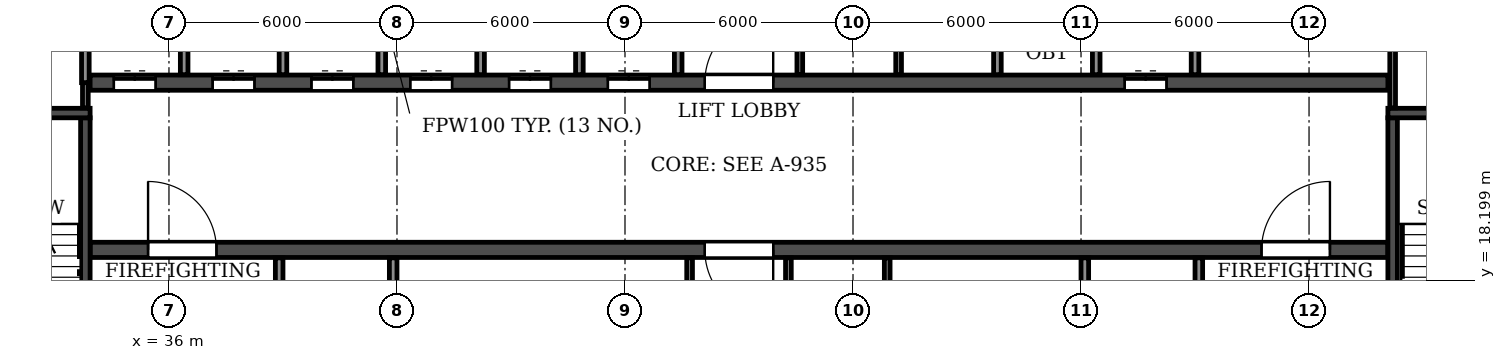
"""IFC4 building model, lengths in metres.
Left out: names, types, materials, properties, quantities, classifications, styles, units other than length and angle.
Written with IfcOpenShell. Run it as: python <this file> out.ifc"""

import sys

from ifc_helpers import new_model, si_unit, direction, frame, frame_2d, origin, place, context, subcontext, project, spatial, rectangle, extrude, element, fill, save


model = new_model("IFC4")
c1 = context("Model", 3, precision=1e-05, world=origin(), true_north=direction((0.0, 1.0)))
c2 = subcontext(c1, "Body", "Model", "MODEL_VIEW")
j1 = project(units=[si_unit("LENGTHUNIT", "METRE"), si_unit("PLANEANGLEUNIT", "RADIAN")], contexts=[c1])
p1 = place(None, origin())
s1 = spatial("IfcSite", under=j1, at=p1, CompositionType="ELEMENT")
p2 = place(p1, origin())
s2 = spatial("IfcBuilding", under=s1, at=p2, CompositionType="ELEMENT")
p3 = place(p2, frame((0.0, 0.0, 201.6)))
s3 = spatial("IfcBuildingStorey", under=s2, at=p3, CompositionType="ELEMENT", Elevation=201.6)
p4 = place(p3, frame((33.925, 19.0, 0.0), z_axis=(0.0, 0.0, 1.0), x_axis=(1.0, 0.0, 0.0)))
e1 = element("IfcWall", 1, at=p4, inside=s3, PredefinedType="SOLIDWALL", context=c2, shape_type="SweptSolid", body=[
    extrude(rectangle(XDim=34.15, YDim=0.4, at=frame_2d((17.075, 0.0))), origin(), (0.0, 0.0, 1.0), 3.08),
])
p5 = place(p4, frame((16.175, 0.0, 0.0)))
e2 = element("IfcOpeningElement", 2, at=p5, cuts=e1, PredefinedType="OPENING", context=c2, shape_type="SweptSolid", body=[
    extrude(rectangle(XDim=1.8, YDim=2.1, at=frame_2d((0.9, 1.05))), frame((0.0, 0.21, 0.0), z_axis=(0.0, -1.0, 0.0), x_axis=(1.0, 0.0, 0.0)), (0.0, 0.0, 1.0), 0.42),
])
p6 = place(p4, frame((1.525, 0.0, 0.0)))
e3 = element("IfcOpeningElement", 3, at=p6, cuts=e1, PredefinedType="OPENING", context=c2, shape_type="SweptSolid", body=[
    extrude(rectangle(XDim=1.8, YDim=2.1, at=frame_2d((0.9, 1.05))), frame((0.0, 0.21, 0.0), z_axis=(0.0, -1.0, 0.0), x_axis=(1.0, 0.0, 0.0)), (0.0, 0.0, 1.0), 0.42),
])
p7 = place(p4, frame((30.825, 0.0, 0.0)))
e4 = element("IfcOpeningElement", 4, at=p7, cuts=e1, PredefinedType="OPENING", context=c2, shape_type="SweptSolid", body=[
    extrude(rectangle(XDim=1.8, YDim=2.1, at=frame_2d((0.9, 1.05))), frame((0.0, 0.21, 0.0), z_axis=(0.0, -1.0, 0.0), x_axis=(1.0, 0.0, 0.0)), (0.0, 0.0, 1.0), 0.42),
])
p8 = place(p3, frame((33.925, 23.4, 0.0), z_axis=(0.0, 0.0, 1.0), x_axis=(1.0, 0.0, 0.0)))
e5 = element("IfcWall", 5, at=p8, inside=s3, PredefinedType="SOLIDWALL", context=c2, shape_type="SweptSolid", body=[
    extrude(rectangle(XDim=34.15, YDim=0.4, at=frame_2d((17.075, 0.0))), origin(), (0.0, 0.0, 1.0), 3.08),
])
p9 = place(p8, frame((16.175, 0.0, 0.0)))
e6 = element("IfcOpeningElement", 6, at=p9, cuts=e5, PredefinedType="OPENING", context=c2, shape_type="SweptSolid", body=[
    extrude(rectangle(XDim=1.8, YDim=2.1, at=frame_2d((0.9, 1.05))), frame((0.0, 0.21, 0.0), z_axis=(0.0, -1.0, 0.0), x_axis=(1.0, 0.0, 0.0)), (0.0, 0.0, 1.0), 0.42),
])
p10 = place(p8, frame((0.625, 0.0, 0.0)))
e7 = element("IfcOpeningElement", 7, at=p10, cuts=e5, PredefinedType="OPENING", context=c2, shape_type="SweptSolid", body=[
    extrude(rectangle(XDim=1.1, YDim=2.1, at=frame_2d((0.55, 1.05))), frame((0.0, 0.21, 0.0), z_axis=(0.0, -1.0, 0.0), x_axis=(1.0, 0.0, 0.0)), (0.0, 0.0, 1.0), 0.42),
])
p11 = place(p8, frame((3.225, 0.0, 0.0)))
e8 = element("IfcOpeningElement", 8, at=p11, cuts=e5, PredefinedType="OPENING", context=c2, shape_type="SweptSolid", body=[
    extrude(rectangle(XDim=1.1, YDim=2.1, at=frame_2d((0.55, 1.05))), frame((0.0, 0.21, 0.0), z_axis=(0.0, -1.0, 0.0), x_axis=(1.0, 0.0, 0.0)), (0.0, 0.0, 1.0), 0.42),
])
p12 = place(p8, frame((5.825, 0.0, 0.0)))
e9 = element("IfcOpeningElement", 9, at=p12, cuts=e5, PredefinedType="OPENING", context=c2, shape_type="SweptSolid", body=[
    extrude(rectangle(XDim=1.1, YDim=2.1, at=frame_2d((0.55, 1.05))), frame((0.0, 0.21, 0.0), z_axis=(0.0, -1.0, 0.0), x_axis=(1.0, 0.0, 0.0)), (0.0, 0.0, 1.0), 0.42),
])
p13 = place(p8, frame((8.425, 0.0, 0.0)))
e10 = element("IfcOpeningElement", 10, at=p13, cuts=e5, PredefinedType="OPENING", context=c2, shape_type="SweptSolid", body=[
    extrude(rectangle(XDim=1.1, YDim=2.1, at=frame_2d((0.55, 1.05))), frame((0.0, 0.21, 0.0), z_axis=(0.0, -1.0, 0.0), x_axis=(1.0, 0.0, 0.0)), (0.0, 0.0, 1.0), 0.42),
])
p14 = place(p8, frame((11.025, 0.0, 0.0)))
e11 = element("IfcOpeningElement", 11, at=p14, cuts=e5, PredefinedType="OPENING", context=c2, shape_type="SweptSolid", body=[
    extrude(rectangle(XDim=1.1, YDim=2.1, at=frame_2d((0.55, 1.05))), frame((0.0, 0.21, 0.0), z_axis=(0.0, -1.0, 0.0), x_axis=(1.0, 0.0, 0.0)), (0.0, 0.0, 1.0), 0.42),
])
p15 = place(p8, frame((13.625, 0.0, 0.0)))
e12 = element("IfcOpeningElement", 12, at=p15, cuts=e5, PredefinedType="OPENING", context=c2, shape_type="SweptSolid", body=[
    extrude(rectangle(XDim=1.1, YDim=2.1, at=frame_2d((0.55, 1.05))), frame((0.0, 0.21, 0.0), z_axis=(0.0, -1.0, 0.0), x_axis=(1.0, 0.0, 0.0)), (0.0, 0.0, 1.0), 0.42),
])
p16 = place(p8, frame((27.225, 0.0, 0.0)))
e13 = element("IfcOpeningElement", 13, at=p16, cuts=e5, PredefinedType="OPENING", context=c2, shape_type="SweptSolid", body=[
    extrude(rectangle(XDim=1.1, YDim=2.1, at=frame_2d((0.55, 1.05))), frame((0.0, 0.21, 0.0), z_axis=(0.0, -1.0, 0.0), x_axis=(1.0, 0.0, 0.0)), (0.0, 0.0, 1.0), 0.42),
])
p17 = place(p3, frame((33.8, 14.8, 0.0), z_axis=(0.0, 0.0, 1.0), x_axis=(0.0, 1.0, 0.0)))
e14 = element("IfcWall", 14, at=p17, inside=s3, PredefinedType="SOLIDWALL", context=c2, shape_type="SweptSolid", body=[
    extrude(rectangle(XDim=7.675, YDim=0.25, at=frame_2d((3.837, 0.0))), origin(), (0.0, 0.0, 1.0), 3.08),
])
p18 = place(p17, frame((0.5, 0.0, 0.0)))
e15 = element("IfcOpeningElement", 15, at=p18, cuts=e14, PredefinedType="OPENING", context=c2, shape_type="SweptSolid", body=[
    extrude(rectangle(XDim=1.0, YDim=2.1, at=frame_2d((0.5, 1.05))), frame((0.0, 0.135, 0.0), z_axis=(0.0, -1.0, 0.0), x_axis=(1.0, 0.0, 0.0)), (0.0, 0.0, 1.0), 0.27),
])
p19 = place(p3, frame((29.875, 22.6, 0.0), z_axis=(0.0, 0.0, 1.0), x_axis=(1.0, 0.0, 0.0)))
e16 = element("IfcWall", 16, at=p19, inside=s3, PredefinedType="SOLIDWALL", context=c2, shape_type="SweptSolid", body=[
    extrude(rectangle(XDim=4.05, YDim=0.25, at=frame_2d((2.025, 0.0))), origin(), (0.0, 0.0, 1.0), 3.08),
])
p20 = place(p3, frame((68.2, 14.8, 0.0), z_axis=(0.0, 0.0, 1.0), x_axis=(0.0, 1.0, 0.0)))
e17 = element("IfcWall", 17, at=p20, inside=s3, PredefinedType="SOLIDWALL", context=c2, shape_type="SweptSolid", body=[
    extrude(rectangle(XDim=7.675, YDim=0.25, at=frame_2d((3.837, 0.0))), origin(), (0.0, 0.0, 1.0), 3.08),
])
p21 = place(p20, frame((0.5, 0.0, 0.0)))
e18 = element("IfcOpeningElement", 18, at=p21, cuts=e17, PredefinedType="OPENING", context=c2, shape_type="SweptSolid", body=[
    extrude(rectangle(XDim=1.0, YDim=2.1, at=frame_2d((0.5, 1.05))), frame((0.0, 0.135, 0.0), z_axis=(0.0, -1.0, 0.0), x_axis=(1.0, 0.0, 0.0)), (0.0, 0.0, 1.0), 0.27),
])
p22 = place(p3, frame((68.075, 22.6, 0.0), z_axis=(0.0, 0.0, 1.0), x_axis=(1.0, 0.0, 0.0)))
e19 = element("IfcWall", 19, at=p22, inside=s3, PredefinedType="SOLIDWALL", context=c2, shape_type="SweptSolid", body=[
    extrude(rectangle(XDim=4.05, YDim=0.25, at=frame_2d((2.025, 0.0))), origin(), (0.0, 0.0, 1.0), 3.08),
])
for number, where, z_axis, x_axis in (
    (20, (49.7, 14.81, 0.0), (0.0, 0.0, 1.0), (0.0, 1.0, 0.0)),
    (21, (52.3, 14.81, 0.0), (0.0, 0.0, 1.0), (0.0, 1.0, 0.0)),
    (22, (52.6, 23.61, 0.0), (0.0, 0.0, 1.0), (0.0, 1.0, 0.0)),
    (23, (54.9, 14.81, 0.0), (0.0, 0.0, 1.0), (0.0, 1.0, 0.0)),
    (24, (55.2, 23.61, 0.0), (0.0, 0.0, 1.0), (0.0, 1.0, 0.0)),
):
    element("IfcWall", number, at=place(p3, frame(where, z_axis=z_axis, x_axis=x_axis)), inside=s3, PredefinedType="PARTITIONING", context=c2, shape_type="SweptSolid", body=[
        extrude(rectangle(XDim=3.98, YDim=0.15, at=frame_2d((1.99, 0.0))), origin(), (0.0, 0.0, 1.0), 3.08),
    ])
p23 = place(p3, frame((33.8, 22.735, 0.0), z_axis=(0.0, 0.0, 1.0), x_axis=(0.0, 1.0, 0.0)))
e25 = element("IfcWall", 25, at=p23, inside=s3, PredefinedType="PARTITIONING", context=c2, shape_type="SweptSolid", body=[
    extrude(rectangle(XDim=0.665, YDim=0.15, at=frame_2d((0.333, 0.0))), origin(), (0.0, 0.0, 1.0), 3.08),
])
p24 = place(p3, frame((68.2, 22.735, 0.0), z_axis=(0.0, 0.0, 1.0), x_axis=(0.0, 1.0, 0.0)))
e26 = element("IfcWall", 26, at=p24, inside=s3, PredefinedType="PARTITIONING", context=c2, shape_type="SweptSolid", body=[
    extrude(rectangle(XDim=4.855, YDim=0.15, at=frame_2d((2.427, 0.0))), origin(), (0.0, 0.0, 1.0), 3.08),
])
p25 = place(p3, frame((33.8, 23.4, 0.0), z_axis=(0.0, 0.0, 1.0), x_axis=(0.0, 1.0, 0.0)))
e27 = element("IfcWall", 27, at=p25, inside=s3, PredefinedType="PARTITIONING", context=c2, shape_type="SweptSolid", body=[
    extrude(rectangle(XDim=2.7, YDim=0.2, at=frame_2d((1.35, 0.0))), origin(), (0.0, 0.0, 1.0), 3.08),
])
p26 = place(p3, frame((36.4, 23.61, 0.0), z_axis=(0.0, 0.0, 1.0), x_axis=(0.0, 1.0, 0.0)))
e28 = element("IfcWall", 28, at=p26, inside=s3, PredefinedType="PARTITIONING", context=c2, shape_type="SweptSolid", body=[
    extrude(rectangle(XDim=2.49, YDim=0.2, at=frame_2d((1.245, 0.0))), origin(), (0.0, 0.0, 1.0), 3.08),
])
p27 = place(p3, frame((38.9, 14.81, 0.0), z_axis=(0.0, 0.0, 1.0), x_axis=(0.0, 1.0, 0.0)))
e29 = element("IfcWall", 29, at=p27, inside=s3, PredefinedType="PARTITIONING", context=c2, shape_type="SweptSolid", body=[
    extrude(rectangle(XDim=3.98, YDim=0.2, at=frame_2d((1.99, 0.0))), origin(), (0.0, 0.0, 1.0), 3.08),
])
p28 = place(p27, frame((1.44, 0.0, 0.0)))
e30 = element("IfcOpeningElement", 30, at=p28, cuts=e29, PredefinedType="OPENING", context=c2, shape_type="SweptSolid", body=[
    extrude(rectangle(XDim=1.1, YDim=2.1, at=frame_2d((0.55, 1.05))), frame((0.0, 0.11, 0.0), z_axis=(0.0, -1.0, 0.0), x_axis=(1.0, 0.0, 0.0)), (0.0, 0.0, 1.0), 0.22),
])
for number, where, z_axis, x_axis in (
    (31, (39.0, 23.61, 0.0), (0.0, 0.0, 1.0), (0.0, 1.0, 0.0)),
    (32, (41.6, 23.61, 0.0), (0.0, 0.0, 1.0), (0.0, 1.0, 0.0)),
):
    element("IfcWall", number, at=place(p3, frame(where, z_axis=z_axis, x_axis=x_axis)), inside=s3, PredefinedType="PARTITIONING", context=c2, shape_type="SweptSolid", body=[
        extrude(rectangle(XDim=2.49, YDim=0.2, at=frame_2d((1.245, 0.0))), origin(), (0.0, 0.0, 1.0), 3.08),
    ])
for number, where, z_axis, x_axis in (
    (33, (41.9, 14.81, 0.0), (0.0, 0.0, 1.0), (0.0, 1.0, 0.0)),
    (34, (44.2, 23.61, 0.0), (0.0, 0.0, 1.0), (0.0, 1.0, 0.0)),
    (35, (46.8, 23.61, 0.0), (0.0, 0.0, 1.0), (0.0, 1.0, 0.0)),
):
    element("IfcWall", number, at=place(p3, frame(where, z_axis=z_axis, x_axis=x_axis)), inside=s3, PredefinedType="PARTITIONING", context=c2, shape_type="SweptSolid", body=[
        extrude(rectangle(XDim=3.98, YDim=0.2, at=frame_2d((1.99, 0.0))), origin(), (0.0, 0.0, 1.0), 3.08),
    ])
for number, where, z_axis, x_axis in (
    (36, (49.4, 23.61, 0.0), (0.0, 0.0, 1.0), (0.0, 1.0, 0.0)),
    (37, (57.8, 23.61, 0.0), (0.0, 0.0, 1.0), (0.0, 1.0, 0.0)),
):
    element("IfcWall", number, at=place(p3, frame(where, z_axis=z_axis, x_axis=x_axis)), inside=s3, PredefinedType="PARTITIONING", context=c2, shape_type="SweptSolid", body=[
        extrude(rectangle(XDim=2.49, YDim=0.2, at=frame_2d((1.245, 0.0))), origin(), (0.0, 0.0, 1.0), 3.08),
    ])
p29 = place(p3, frame((60.1, 14.81, 0.0), z_axis=(0.0, 0.0, 1.0), x_axis=(0.0, 1.0, 0.0)))
e38 = element("IfcWall", 38, at=p29, inside=s3, PredefinedType="PARTITIONING", context=c2, shape_type="SweptSolid", body=[
    extrude(rectangle(XDim=3.98, YDim=0.2, at=frame_2d((1.99, 0.0))), origin(), (0.0, 0.0, 1.0), 3.08),
])
for number, where, z_axis, x_axis in (
    (39, (60.4, 23.61, 0.0), (0.0, 0.0, 1.0), (0.0, 1.0, 0.0)),
    (40, (63.0, 23.61, 0.0), (0.0, 0.0, 1.0), (0.0, 1.0, 0.0)),
):
    element("IfcWall", number, at=place(p3, frame(where, z_axis=z_axis, x_axis=x_axis)), inside=s3, PredefinedType="PARTITIONING", context=c2, shape_type="SweptSolid", body=[
        extrude(rectangle(XDim=2.49, YDim=0.2, at=frame_2d((1.245, 0.0))), origin(), (0.0, 0.0, 1.0), 3.08),
    ])
p30 = place(p3, frame((63.1, 14.81, 0.0), z_axis=(0.0, 0.0, 1.0), x_axis=(0.0, 1.0, 0.0)))
e41 = element("IfcWall", 41, at=p30, inside=s3, PredefinedType="PARTITIONING", context=c2, shape_type="SweptSolid", body=[
    extrude(rectangle(XDim=3.98, YDim=0.2, at=frame_2d((1.99, 0.0))), origin(), (0.0, 0.0, 1.0), 3.08),
])
p31 = place(p30, frame((1.44, 0.0, 0.0)))
e42 = element("IfcOpeningElement", 42, at=p31, cuts=e41, PredefinedType="OPENING", context=c2, shape_type="SweptSolid", body=[
    extrude(rectangle(XDim=1.1, YDim=2.1, at=frame_2d((0.55, 1.05))), frame((0.0, 0.11, 0.0), z_axis=(0.0, -1.0, 0.0), x_axis=(1.0, 0.0, 0.0)), (0.0, 0.0, 1.0), 0.22),
])
p32 = place(p9, origin())
e43 = element("IfcDoor", 43, at=p32, inside=s3, OperationType="DOUBLE_DOOR_SINGLE_SWING", PredefinedType="DOOR", context=c2, shape_type="SweptSolid", body=[
    extrude(rectangle(XDim=1.8, YDim=2.1, at=frame_2d((0.9, 1.05))), frame((0.0, 0.025, 0.0), z_axis=(0.0, -1.0, 0.0), x_axis=(1.0, 0.0, 0.0)), (0.0, 0.0, 1.0), 0.05),
])
fill(e6, e43)
p33 = place(p5, frame((1.8, 0.0, 0.0), z_axis=(0.0, 0.0, 1.0), x_axis=(-1.0, 0.0, 0.0)))
e44 = element("IfcDoor", 44, at=p33, inside=s3, OperationType="DOUBLE_DOOR_SINGLE_SWING", PredefinedType="DOOR", context=c2, shape_type="SweptSolid", body=[
    extrude(rectangle(XDim=1.8, YDim=2.1, at=frame_2d((0.9, 1.05))), frame((0.0, 0.025, 0.0), z_axis=(0.0, -1.0, 0.0), x_axis=(1.0, 0.0, 0.0)), (0.0, 0.0, 1.0), 0.05),
])
fill(e2, e44)
p34 = place(p10, origin())
e45 = element("IfcDoor", 45, at=p34, inside=s3, OperationType="DOUBLE_DOOR_SLIDING", PredefinedType="DOOR", context=c2, shape_type="SweptSolid", body=[
    extrude(rectangle(XDim=1.1, YDim=2.1, at=frame_2d((0.55, 1.05))), frame((0.0, 0.025, 0.0), z_axis=(0.0, -1.0, 0.0), x_axis=(1.0, 0.0, 0.0)), (0.0, 0.0, 1.0), 0.05),
])
fill(e7, e45)
p35 = place(p6, origin())
e46 = element("IfcDoor", 46, at=p35, inside=s3, OperationType="DOUBLE_DOOR_SINGLE_SWING", PredefinedType="DOOR", context=c2, shape_type="SweptSolid", body=[
    extrude(rectangle(XDim=1.8, YDim=2.1, at=frame_2d((0.9, 1.05))), frame((0.0, 0.025, 0.0), z_axis=(0.0, -1.0, 0.0), x_axis=(1.0, 0.0, 0.0)), (0.0, 0.0, 1.0), 0.05),
])
fill(e3, e46)
p36 = place(p11, origin())
e47 = element("IfcDoor", 47, at=p36, inside=s3, OperationType="DOUBLE_DOOR_SLIDING", PredefinedType="DOOR", context=c2, shape_type="SweptSolid", body=[
    extrude(rectangle(XDim=1.1, YDim=2.1, at=frame_2d((0.55, 1.05))), frame((0.0, 0.025, 0.0), z_axis=(0.0, -1.0, 0.0), x_axis=(1.0, 0.0, 0.0)), (0.0, 0.0, 1.0), 0.05),
])
fill(e8, e47)
p37 = place(p12, origin())
e48 = element("IfcDoor", 48, at=p37, inside=s3, OperationType="DOUBLE_DOOR_SLIDING", PredefinedType="DOOR", context=c2, shape_type="SweptSolid", body=[
    extrude(rectangle(XDim=1.1, YDim=2.1, at=frame_2d((0.55, 1.05))), frame((0.0, 0.025, 0.0), z_axis=(0.0, -1.0, 0.0), x_axis=(1.0, 0.0, 0.0)), (0.0, 0.0, 1.0), 0.05),
])
fill(e9, e48)
p38 = place(p13, origin())
e49 = element("IfcDoor", 49, at=p38, inside=s3, OperationType="DOUBLE_DOOR_SLIDING", PredefinedType="DOOR", context=c2, shape_type="SweptSolid", body=[
    extrude(rectangle(XDim=1.1, YDim=2.1, at=frame_2d((0.55, 1.05))), frame((0.0, 0.025, 0.0), z_axis=(0.0, -1.0, 0.0), x_axis=(1.0, 0.0, 0.0)), (0.0, 0.0, 1.0), 0.05),
])
fill(e10, e49)
p39 = place(p14, origin())
e50 = element("IfcDoor", 50, at=p39, inside=s3, OperationType="DOUBLE_DOOR_SLIDING", PredefinedType="DOOR", context=c2, shape_type="SweptSolid", body=[
    extrude(rectangle(XDim=1.1, YDim=2.1, at=frame_2d((0.55, 1.05))), frame((0.0, 0.025, 0.0), z_axis=(0.0, -1.0, 0.0), x_axis=(1.0, 0.0, 0.0)), (0.0, 0.0, 1.0), 0.05),
])
fill(e11, e50)
p40 = place(p15, origin())
e51 = element("IfcDoor", 51, at=p40, inside=s3, OperationType="DOUBLE_DOOR_SLIDING", PredefinedType="DOOR", context=c2, shape_type="SweptSolid", body=[
    extrude(rectangle(XDim=1.1, YDim=2.1, at=frame_2d((0.55, 1.05))), frame((0.0, 0.025, 0.0), z_axis=(0.0, -1.0, 0.0), x_axis=(1.0, 0.0, 0.0)), (0.0, 0.0, 1.0), 0.05),
])
fill(e12, e51)
p41 = place(p16, origin())
e52 = element("IfcDoor", 52, at=p41, inside=s3, OperationType="DOUBLE_DOOR_SLIDING", PredefinedType="DOOR", context=c2, shape_type="SweptSolid", body=[
    extrude(rectangle(XDim=1.1, YDim=2.1, at=frame_2d((0.55, 1.05))), frame((0.0, 0.025, 0.0), z_axis=(0.0, -1.0, 0.0), x_axis=(1.0, 0.0, 0.0)), (0.0, 0.0, 1.0), 0.05),
])
fill(e13, e52)
p42 = place(p7, origin())
e53 = element("IfcDoor", 53, at=p42, inside=s3, OperationType="DOUBLE_DOOR_SINGLE_SWING", PredefinedType="DOOR", context=c2, shape_type="SweptSolid", body=[
    extrude(rectangle(XDim=1.8, YDim=2.1, at=frame_2d((0.9, 1.05))), frame((0.0, 0.025, 0.0), z_axis=(0.0, -1.0, 0.0), x_axis=(1.0, 0.0, 0.0)), (0.0, 0.0, 1.0), 0.05),
])
fill(e4, e53)
save(model, sys.argv[1])
